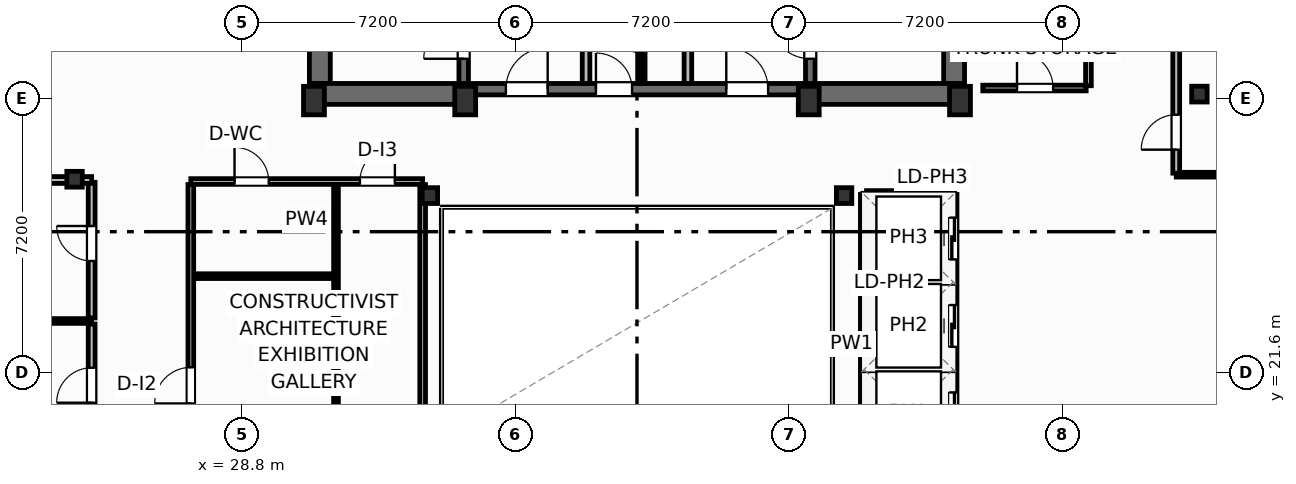
"""IFC4 building model, lengths in metres.
Left out: names, types, materials, properties, quantities, classifications, styles, units other than length and angle.
Written with IfcOpenShell. Run it as: python <this file> out.ifc"""

import sys

from ifc_helpers import new_model, si_unit, direction, frame, frame_2d, origin, origin_2d, place, context, subcontext, project, spatial, rectangle, i_section, extrude, element, fill, save


model = new_model("IFC4")
c1 = context("Model", 3, precision=1e-05, world=origin(), true_north=direction((0.0, 1.0)))
c2 = subcontext(c1, "Body", "Model", "MODEL_VIEW")
j1 = project(units=[si_unit("LENGTHUNIT", "METRE"), si_unit("PLANEANGLEUNIT", "RADIAN")], contexts=[c1])
p1 = place(None, origin())
s1 = spatial("IfcSite", under=j1, at=p1, CompositionType="ELEMENT")
p2 = place(p1, origin())
s2 = spatial("IfcBuilding", under=s1, at=p2, CompositionType="ELEMENT")
p3 = place(p2, frame((0.0, 0.0, 276.7)))
s3 = spatial("IfcBuildingStorey", under=s2, at=p3, CompositionType="ELEMENT", Elevation=276.7)
for number, where, z_axis, x_axis in (
    (1, (30.7, 28.75, 0.0), (0.0, 0.0, 1.0), (1.0, 0.0, 0.0)),
    (2, (34.68, 28.75, 0.0), (0.0, 0.0, 1.0), (1.0, 0.0, 0.0)),
    (3, (43.72, 28.75, 0.0), (0.0, 0.0, 1.0), (1.0, 0.0, 0.0)),
    (4, (47.7, 28.75, 0.0), (0.0, 0.0, 1.0), (1.0, 0.0, 0.0)),
):
    element("IfcColumn", number, at=place(p3, frame(where, z_axis=z_axis, x_axis=x_axis)), inside=s3, PredefinedType="COLUMN", context=c2, shape_type="SweptSolid", body=[
        extrude(rectangle(XDim=0.55, YDim=0.75, at=origin_2d()), origin(), (0.0, 0.0, 1.0), 3.7),
    ])
for number, where, z_axis, x_axis in (
    (5, (33.75, 26.25, 0.0), (0.0, 0.0, 1.0), (1.0, 0.0, 0.0)),
    (6, (44.65, 26.25, 0.0), (0.0, 0.0, 1.0), (1.0, 0.0, 0.0)),
    (7, (24.4, 26.68, 0.0), (0.0, 0.0, 1.0), (1.0, 0.0, 0.0)),
    (8, (54.0, 28.92, 0.0), (0.0, 0.0, 1.0), (1.0, 0.0, 0.0)),
):
    element("IfcColumn", number, at=place(p3, frame(where, z_axis=z_axis, x_axis=x_axis)), inside=s3, PredefinedType="COLUMN", context=c2, shape_type="SweptSolid", body=[
        extrude(i_section(OverallWidth=0.406, OverallDepth=0.416, WebThickness=0.03, FlangeThickness=0.048, FilletRadius=0.025, at=origin_2d()), origin(), (0.0, 0.0, 1.0), 3.7),
    ])
for number, where, z_axis, x_axis in (
    (9, (30.855, 29.2, 0.0), (0.0, 0.0, 1.0), (0.0, 1.0, 0.0)),
    (10, (47.545, 29.2, 0.0), (0.0, 0.0, 1.0), (0.0, 1.0, 0.0)),
):
    element("IfcWall", number, at=place(p3, frame(where, z_axis=z_axis, x_axis=x_axis)), inside=s3, PredefinedType="SHEAR", context=c2, shape_type="SweptSolid", body=[
        extrude(rectangle(XDim=9.22, YDim=0.55, at=frame_2d((4.61, 0.0))), origin(), (0.0, 0.0, 1.0), 3.45),
    ])
for number, where, z_axis, x_axis in (
    (11, (30.58, 28.925, 0.0), (0.0, 0.0, 1.0), (1.0, 0.0, 0.0)),
    (12, (43.6, 28.925, 0.0), (0.0, 0.0, 1.0), (1.0, 0.0, 0.0)),
):
    element("IfcWall", number, at=place(p3, frame(where, z_axis=z_axis, x_axis=x_axis)), inside=s3, PredefinedType="SHEAR", context=c2, shape_type="SweptSolid", body=[
        extrude(rectangle(XDim=4.22, YDim=0.55, at=frame_2d((2.11, 0.0))), origin(), (0.0, 0.0, 1.0), 3.45),
    ])
p4 = place(p3, frame((34.8, 29.05, 0.0), z_axis=(0.0, 0.0, 1.0), x_axis=(1.0, 0.0, 0.0)))
e13 = element("IfcWall", 13, at=p4, inside=s3, PredefinedType="SHEAR", context=c2, shape_type="SweptSolid", body=[
    extrude(rectangle(XDim=8.8, YDim=0.3, at=frame_2d((4.4, 0.0))), origin(), (0.0, 0.0, 1.0), 3.45),
])
p5 = place(p4, frame((0.95, 0.0, 0.0)))
e14 = element("IfcOpeningElement", 14, at=p5, cuts=e13, PredefinedType="OPENING", context=c2, shape_type="SweptSolid", body=[
    extrude(rectangle(XDim=1.1, YDim=2.15, at=frame_2d((0.55, 1.075))), frame((0.0, 0.16, 0.0), z_axis=(0.0, -1.0, 0.0), x_axis=(1.0, 0.0, 0.0)), (0.0, 0.0, 1.0), 0.32),
])
p6 = place(p4, frame((6.75, 0.0, 0.0)))
e15 = element("IfcOpeningElement", 15, at=p6, cuts=e13, PredefinedType="OPENING", context=c2, shape_type="SweptSolid", body=[
    extrude(rectangle(XDim=1.1, YDim=2.15, at=frame_2d((0.55, 1.075))), frame((0.0, 0.16, 0.0), z_axis=(0.0, -1.0, 0.0), x_axis=(1.0, 0.0, 0.0)), (0.0, 0.0, 1.0), 0.32),
])
p7 = place(p4, frame((3.32, 0.0, 0.0)))
e16 = element("IfcOpeningElement", 16, at=p7, cuts=e13, PredefinedType="OPENING", context=c2, shape_type="SweptSolid", body=[
    extrude(rectangle(XDim=0.95, YDim=2.15, at=frame_2d((0.475, 1.075))), frame((0.0, 0.16, 0.0), z_axis=(0.0, -1.0, 0.0), x_axis=(1.0, 0.0, 0.0)), (0.0, 0.0, 1.0), 0.32),
])
p8 = place(p3, frame((34.64, 29.2, 0.0), z_axis=(0.0, 0.0, 1.0), x_axis=(0.0, 1.0, 0.0)))
e17 = element("IfcWall", 17, at=p8, inside=s3, PredefinedType="SHEAR", context=c2, shape_type="SweptSolid", body=[
    extrude(rectangle(XDim=9.22, YDim=0.25, at=frame_2d((4.61, 0.0))), origin(), (0.0, 0.0, 1.0), 3.45),
])
p9 = place(p8, frame((0.65, 0.0, 0.0)))
e18 = element("IfcOpeningElement", 18, at=p9, cuts=e17, PredefinedType="OPENING", context=c2, shape_type="SweptSolid", body=[
    extrude(rectangle(XDim=1.05, YDim=2.15, at=frame_2d((0.525, 1.075))), frame((0.0, 0.135, 0.0), z_axis=(0.0, -1.0, 0.0), x_axis=(1.0, 0.0, 0.0)), (0.0, 0.0, 1.0), 0.27),
])
p10 = place(p3, frame((43.76, 29.2, 0.0), z_axis=(0.0, 0.0, 1.0), x_axis=(0.0, 1.0, 0.0)))
e19 = element("IfcWall", 19, at=p10, inside=s3, PredefinedType="SHEAR", context=c2, shape_type="SweptSolid", body=[
    extrude(rectangle(XDim=9.22, YDim=0.25, at=frame_2d((4.61, 0.0))), origin(), (0.0, 0.0, 1.0), 3.45),
])
p11 = place(p10, frame((0.65, 0.0, 0.0)))
e20 = element("IfcOpeningElement", 20, at=p11, cuts=e19, PredefinedType="OPENING", context=c2, shape_type="SweptSolid", body=[
    extrude(rectangle(XDim=1.05, YDim=2.15, at=frame_2d((0.525, 1.075))), frame((0.0, 0.135, 0.0), z_axis=(0.0, -1.0, 0.0), x_axis=(1.0, 0.0, 0.0)), (0.0, 0.0, 1.0), 0.27),
])
p12 = place(p3, frame((24.85, 19.3, 0.0), z_axis=(0.0, 0.0, 1.0), x_axis=(0.0, 1.0, 0.0)))
e21 = element("IfcWall", 21, at=p12, inside=s3, PredefinedType="PARTITIONING", context=c2, shape_type="SweptSolid", body=[
    extrude(rectangle(XDim=3.57, YDim=0.18, at=frame_2d((1.785, 0.0))), origin(), (0.0, 0.0, 1.0), 3.45),
])
p13 = place(p12, frame((1.5, 0.0, 0.0)))
e22 = element("IfcOpeningElement", 22, at=p13, cuts=e21, PredefinedType="OPENING", context=c2, shape_type="SweptSolid", body=[
    extrude(rectangle(XDim=0.92, YDim=2.05, at=frame_2d((0.46, 1.025))), frame((0.0, 0.1, 0.0), z_axis=(0.0, -1.0, 0.0), x_axis=(1.0, 0.0, 0.0)), (0.0, 0.0, 1.0), 0.2),
])
p14 = place(p3, frame((24.85, 23.03, 0.0), z_axis=(0.0, 0.0, 1.0), x_axis=(0.0, 1.0, 0.0)))
e23 = element("IfcWall", 23, at=p14, inside=s3, PredefinedType="PARTITIONING", context=c2, shape_type="SweptSolid", body=[
    extrude(rectangle(XDim=3.57, YDim=0.18, at=frame_2d((1.785, 0.0))), origin(), (0.0, 0.0, 1.0), 3.45),
])
p15 = place(p14, frame((1.5, 0.0, 0.0)))
e24 = element("IfcOpeningElement", 24, at=p15, cuts=e23, PredefinedType="OPENING", context=c2, shape_type="SweptSolid", body=[
    extrude(rectangle(XDim=0.92, YDim=2.05, at=frame_2d((0.46, 1.025))), frame((0.0, 0.1, 0.0), z_axis=(0.0, -1.0, 0.0), x_axis=(1.0, 0.0, 0.0)), (0.0, 0.0, 1.0), 0.2),
])
p16 = place(p3, frame((2.424, 22.95, 0.0), z_axis=(0.0, 0.0, 1.0), x_axis=(1.0, 0.0, 0.0)))
e25 = element("IfcWall", 25, at=p16, inside=s3, PredefinedType="PARTITIONING", context=c2, shape_type="SweptSolid", body=[
    extrude(rectangle(XDim=22.426, YDim=0.125, at=frame_2d((11.213, 0.0))), origin(), (0.0, 0.0, 1.0), 3.45),
])
p17 = place(p3, frame((5.107, 26.66, 0.0), z_axis=(0.0, 0.0, 1.0), x_axis=(1.0, 0.0, 0.0)))
e26 = element("IfcWall", 26, at=p17, inside=s3, PredefinedType="PARTITIONING", context=c2, shape_type="SweptSolid", body=[
    extrude(rectangle(XDim=19.743, YDim=0.18, at=frame_2d((9.872, 0.0))), origin(), (0.0, 0.0, 1.0), 2.662),
])
p18 = place(p3, frame((53.39, 26.8, 0.0), z_axis=(0.0, 0.0, 1.0), x_axis=(1.0, 0.0, 0.0)))
e27 = element("IfcWall", 27, at=p18, inside=s3, PredefinedType="PARTITIONING", context=c2, shape_type="SweptSolid", body=[
    extrude(rectangle(XDim=22.348, YDim=0.125, at=frame_2d((11.174, 0.0))), origin(), (0.0, 0.0, 1.0), 3.45),
])
p19 = place(p3, frame((53.39, 26.84, 0.0), z_axis=(0.0, 0.0, 1.0), x_axis=(0.0, 1.0, 0.0)))
e28 = element("IfcWall", 28, at=p19, inside=s3, PredefinedType="PARTITIONING", context=c2, shape_type="SweptSolid", body=[
    extrude(rectangle(XDim=12.46, YDim=0.18, at=frame_2d((6.23, 0.0))), origin(), (0.0, 0.0, 1.0), 3.45),
])
p20 = place(p19, frame((0.618, 0.0, 0.0)))
e29 = element("IfcOpeningElement", 29, at=p20, cuts=e28, PredefinedType="OPENING", context=c2, shape_type="SweptSolid", body=[
    extrude(rectangle(XDim=0.92, YDim=2.05, at=frame_2d((0.46, 1.025))), frame((0.0, 0.1, 0.0), z_axis=(0.0, -1.0, 0.0), x_axis=(1.0, 0.0, 0.0)), (0.0, 0.0, 1.0), 0.2),
])
for number, where, z_axis, x_axis in (
    (30, (37.86, 29.2, 0.0), (0.0, 0.0, 1.0), (0.0, 1.0, 0.0)),
    (31, (40.54, 29.2, 0.0), (0.0, 0.0, 1.0), (0.0, 1.0, 0.0)),
):
    element("IfcWall", number, at=place(p3, frame(where, z_axis=z_axis, x_axis=x_axis)), inside=s3, PredefinedType="PARTITIONING", context=c2, shape_type="SweptSolid", body=[
        extrude(rectangle(XDim=5.18, YDim=0.2, at=frame_2d((2.59, 0.0))), origin(), (0.0, 0.0, 1.0), 3.45),
    ])
p21 = place(p3, frame((39.35, 29.2, 0.0), z_axis=(0.0, 0.0, 1.0), x_axis=(0.0, 1.0, 0.0)))
e32 = element("IfcWall", 32, at=p21, inside=s3, PredefinedType="PARTITIONING", context=c2, shape_type="SweptSolid", body=[
    extrude(rectangle(XDim=5.22, YDim=0.125, at=frame_2d((2.61, 0.0))), origin(), (0.0, 0.0, 1.0), 3.45),
])
p22 = place(p21, frame((0.8, 0.0, 0.0)))
e33 = element("IfcOpeningElement", 33, at=p22, cuts=e32, PredefinedType="OPENING", context=c2, shape_type="SweptSolid", body=[
    extrude(rectangle(XDim=0.85, YDim=2.05, at=frame_2d((0.425, 1.025))), frame((0.0, 0.073, 0.0), z_axis=(0.0, -1.0, 0.0), x_axis=(1.0, 0.0, 0.0)), (0.0, 0.0, 1.0), 0.145),
])
p23 = place(p21, frame((3.4, 0.0, 0.0)))
e34 = element("IfcOpeningElement", 34, at=p23, cuts=e32, PredefinedType="OPENING", context=c2, shape_type="SweptSolid", body=[
    extrude(rectangle(XDim=0.85, YDim=2.05, at=frame_2d((0.425, 1.025))), frame((0.0, 0.073, 0.0), z_axis=(0.0, -1.0, 0.0), x_axis=(1.0, 0.0, 0.0)), (0.0, 0.0, 1.0), 0.145),
])
p24 = place(p3, frame((27.46, 26.62, 0.0), z_axis=(0.0, 0.0, 1.0), x_axis=(1.0, 0.0, 0.0)))
e35 = element("IfcWall", 35, at=p24, inside=s3, PredefinedType="PARTITIONING", context=c2, shape_type="SweptSolid", body=[
    extrude(rectangle(XDim=6.1, YDim=0.15, at=frame_2d((3.05, 0.0))), origin(), (0.0, 0.0, 1.0), 2.662),
])
p25 = place(p24, frame((1.15, 0.0, 0.0)))
e36 = element("IfcOpeningElement", 36, at=p25, cuts=e35, PredefinedType="OPENING", context=c2, shape_type="SweptSolid", body=[
    extrude(rectangle(XDim=0.9, YDim=2.05, at=frame_2d((0.45, 1.025))), frame((0.0, 0.085, 0.0), z_axis=(0.0, -1.0, 0.0), x_axis=(1.0, 0.0, 0.0)), (0.0, 0.0, 1.0), 0.17),
])
p26 = place(p24, frame((4.45, 0.0, 0.0)))
e37 = element("IfcOpeningElement", 37, at=p26, cuts=e35, PredefinedType="OPENING", context=c2, shape_type="SweptSolid", body=[
    extrude(rectangle(XDim=0.92, YDim=2.05, at=frame_2d((0.46, 1.025))), frame((0.0, 0.085, 0.0), z_axis=(0.0, -1.0, 0.0), x_axis=(1.0, 0.0, 0.0)), (0.0, 0.0, 1.0), 0.17),
])
p27 = place(p3, frame((31.28, 19.38, 0.0), z_axis=(0.0, 0.0, 1.0), x_axis=(0.0, 1.0, 0.0)))
e38 = element("IfcWall", 38, at=p27, inside=s3, PredefinedType="PARTITIONING", context=c2, shape_type="SweptSolid", body=[
    extrude(rectangle(XDim=7.16, YDim=0.125, at=frame_2d((3.58, 0.0))), origin(), (0.0, 0.0, 1.0), 3.45),
])
p28 = place(p3, frame((27.52, 24.13, 0.0), z_axis=(0.0, 0.0, 1.0), x_axis=(1.0, 0.0, 0.0)))
e39 = element("IfcWall", 39, at=p28, inside=s3, PredefinedType="PARTITIONING", context=c2, shape_type="SweptSolid", body=[
    extrude(rectangle(XDim=3.7, YDim=0.125, at=frame_2d((1.85, 0.0))), origin(), (0.0, 0.0, 1.0), 3.45),
])
p29 = place(p3, frame((27.46, 19.38, 0.0), z_axis=(0.0, 0.0, 1.0), x_axis=(0.0, 1.0, 0.0)))
e40 = element("IfcWall", 40, at=p29, inside=s3, PredefinedType="PARTITIONING", context=c2, shape_type="SweptSolid", body=[
    extrude(rectangle(XDim=7.16, YDim=0.15, at=frame_2d((3.58, 0.0))), origin(), (0.0, 0.0, 1.0), 3.45),
])
p30 = place(p29, frame((1.4, 0.0, 0.0)))
e41 = element("IfcOpeningElement", 41, at=p30, cuts=e40, PredefinedType="OPENING", context=c2, shape_type="SweptSolid", body=[
    extrude(rectangle(XDim=0.95, YDim=2.05, at=frame_2d((0.475, 1.025))), frame((0.0, 0.085, 0.0), z_axis=(0.0, -1.0, 0.0), x_axis=(1.0, 0.0, 0.0)), (0.0, 0.0, 1.0), 0.17),
])
p31 = place(p3, frame((33.56, 19.38, 0.0), z_axis=(0.0, 0.0, 1.0), x_axis=(0.0, 1.0, 0.0)))
e42 = element("IfcWall", 42, at=p31, inside=s3, PredefinedType="PARTITIONING", context=c2, shape_type="SweptSolid", body=[
    extrude(rectangle(XDim=7.16, YDim=0.15, at=frame_2d((3.58, 0.0))), origin(), (0.0, 0.0, 1.0), 2.824),
])
p32 = place(p3, frame((48.3, 29.08, 0.0), z_axis=(0.0, 0.0, 1.0), x_axis=(1.0, 0.0, 0.0)))
e43 = element("IfcWall", 43, at=p32, inside=s3, PredefinedType="PARTITIONING", context=c2, shape_type="SweptSolid", body=[
    extrude(rectangle(XDim=2.72, YDim=0.15, at=frame_2d((1.36, 0.0))), origin(), (0.0, 0.0, 1.0), 2.662),
])
p33 = place(p32, frame((0.9, 0.0, 0.0)))
e44 = element("IfcOpeningElement", 44, at=p33, cuts=e43, PredefinedType="OPENING", context=c2, shape_type="SweptSolid", body=[
    extrude(rectangle(XDim=0.95, YDim=2.05, at=frame_2d((0.475, 1.025))), frame((0.0, 0.085, 0.0), z_axis=(0.0, -1.0, 0.0), x_axis=(1.0, 0.0, 0.0)), (0.0, 0.0, 1.0), 0.17),
])
p34 = place(p3, frame((51.08, 29.14, 0.0), z_axis=(0.0, 0.0, 1.0), x_axis=(0.0, 1.0, 0.0)))
e45 = element("IfcWall", 45, at=p34, inside=s3, PredefinedType="PARTITIONING", context=c2, shape_type="SweptSolid", body=[
    extrude(rectangle(XDim=4.69, YDim=0.15, at=frame_2d((2.345, 0.0))), origin(), (0.0, 0.0, 1.0), 3.45),
])
for number, where, z_axis, x_axis in (
    (46, (45.24, 21.675, 0.0), (0.0, 0.0, 1.0), (1.0, 0.0, 0.0)),
    (47, (45.24, 23.975, 0.0), (0.0, 0.0, 1.0), (1.0, 0.0, 0.0)),
    (48, (45.24, 26.28, 0.0), (0.0, 0.0, 1.0), (1.0, 0.0, 0.0)),
):
    element("IfcWall", number, at=place(p3, frame(where, z_axis=z_axis, x_axis=x_axis)), inside=s3, PredefinedType="PARTITIONING", context=c2, shape_type="SweptSolid", body=[
        extrude(rectangle(XDim=2.22, YDim=0.2, at=frame_2d((1.11, 0.0))), origin(), (0.0, 0.0, 1.0), 3.45),
    ])
p35 = place(p3, frame((45.18, 19.38, 0.0), z_axis=(0.0, 0.0, 1.0), x_axis=(0.0, 1.0, 0.0)))
e49 = element("IfcWall", 49, at=p35, inside=s3, PredefinedType="PARTITIONING", context=c2, shape_type="SweptSolid", body=[
    extrude(rectangle(XDim=6.9, YDim=0.2, at=frame_2d((3.45, 0.0))), origin(), (0.0, 0.0, 1.0), 3.45),
])
p36 = place(p3, frame((47.52, 19.38, 0.0), z_axis=(0.0, 0.0, 1.0), x_axis=(0.0, 1.0, 0.0)))
e50 = element("IfcWall", 50, at=p36, inside=s3, PredefinedType="PARTITIONING", context=c2, shape_type="SweptSolid", body=[
    extrude(rectangle(XDim=6.9, YDim=0.2, at=frame_2d((3.45, 0.0))), origin(), (0.0, 0.0, 1.0), 3.45),
])
p37 = place(p36, frame((0.59, 0.0, 0.0)))
e51 = element("IfcOpeningElement", 51, at=p37, cuts=e50, PredefinedType="OPENING", context=c2, shape_type="SweptSolid", body=[
    extrude(rectangle(XDim=1.1, YDim=2.15, at=frame_2d((0.55, 1.075))), frame((0.0, 0.11, 0.0), z_axis=(0.0, -1.0, 0.0), x_axis=(1.0, 0.0, 0.0)), (0.0, 0.0, 1.0), 0.22),
])
p38 = place(p36, frame((2.89, 0.0, 0.0)))
e52 = element("IfcOpeningElement", 52, at=p38, cuts=e50, PredefinedType="OPENING", context=c2, shape_type="SweptSolid", body=[
    extrude(rectangle(XDim=1.1, YDim=2.15, at=frame_2d((0.55, 1.075))), frame((0.0, 0.11, 0.0), z_axis=(0.0, -1.0, 0.0), x_axis=(1.0, 0.0, 0.0)), (0.0, 0.0, 1.0), 0.22),
])
p39 = place(p36, frame((5.19, 0.0, 0.0)))
e53 = element("IfcOpeningElement", 53, at=p39, cuts=e50, PredefinedType="OPENING", context=c2, shape_type="SweptSolid", body=[
    extrude(rectangle(XDim=1.1, YDim=2.15, at=frame_2d((0.55, 1.075))), frame((0.0, 0.11, 0.0), z_axis=(0.0, -1.0, 0.0), x_axis=(1.0, 0.0, 0.0)), (0.0, 0.0, 1.0), 0.22),
])
p40 = place(p13, origin())
e54 = element("IfcDoor", 54, at=p40, inside=s3, OperationType="SINGLE_SWING_LEFT", PredefinedType="DOOR", context=c2, shape_type="SweptSolid", body=[
    extrude(rectangle(XDim=0.92, YDim=2.05, at=frame_2d((0.46, 1.025))), frame((0.0, 0.025, 0.0), z_axis=(0.0, -1.0, 0.0), x_axis=(1.0, 0.0, 0.0)), (0.0, 0.0, 1.0), 0.05),
])
fill(e22, e54)
p41 = place(p15, origin())
e55 = element("IfcDoor", 55, at=p41, inside=s3, OperationType="SINGLE_SWING_RIGHT", PredefinedType="DOOR", context=c2, shape_type="SweptSolid", body=[
    extrude(rectangle(XDim=0.92, YDim=2.05, at=frame_2d((0.46, 1.025))), frame((0.0, 0.025, 0.0), z_axis=(0.0, -1.0, 0.0), x_axis=(1.0, 0.0, 0.0)), (0.0, 0.0, 1.0), 0.05),
])
fill(e24, e55)
p42 = place(p20, origin())
e56 = element("IfcDoor", 56, at=p42, inside=s3, OperationType="SINGLE_SWING_LEFT", PredefinedType="DOOR", context=c2, shape_type="SweptSolid", body=[
    extrude(rectangle(XDim=0.92, YDim=2.05, at=frame_2d((0.46, 1.025))), frame((0.0, 0.025, 0.0), z_axis=(0.0, -1.0, 0.0), x_axis=(1.0, 0.0, 0.0)), (0.0, 0.0, 1.0), 0.05),
])
fill(e29, e56)
p43 = place(p9, origin())
e57 = element("IfcDoor", 57, at=p43, inside=s3, OperationType="SINGLE_SWING_LEFT", PredefinedType="DOOR", context=c2, shape_type="SweptSolid", body=[
    extrude(rectangle(XDim=1.05, YDim=2.15, at=frame_2d((0.525, 1.075))), frame((0.0, 0.025, 0.0), z_axis=(0.0, -1.0, 0.0), x_axis=(1.0, 0.0, 0.0)), (0.0, 0.0, 1.0), 0.05),
])
fill(e18, e57)
p44 = place(p11, origin())
e58 = element("IfcDoor", 58, at=p44, inside=s3, OperationType="SINGLE_SWING_RIGHT", PredefinedType="DOOR", context=c2, shape_type="SweptSolid", body=[
    extrude(rectangle(XDim=1.05, YDim=2.15, at=frame_2d((0.525, 1.075))), frame((0.0, 0.025, 0.0), z_axis=(0.0, -1.0, 0.0), x_axis=(1.0, 0.0, 0.0)), (0.0, 0.0, 1.0), 0.05),
])
fill(e20, e58)
p45 = place(p5, origin())
e59 = element("IfcDoor", 59, at=p45, inside=s3, OperationType="SINGLE_SWING_RIGHT", PredefinedType="DOOR", context=c2, shape_type="SweptSolid", body=[
    extrude(rectangle(XDim=1.1, YDim=2.15, at=frame_2d((0.55, 1.075))), frame((0.0, 0.025, 0.0), z_axis=(0.0, -1.0, 0.0), x_axis=(1.0, 0.0, 0.0)), (0.0, 0.0, 1.0), 0.05),
])
fill(e14, e59)
p46 = place(p6, origin())
e60 = element("IfcDoor", 60, at=p46, inside=s3, OperationType="SINGLE_SWING_LEFT", PredefinedType="DOOR", context=c2, shape_type="SweptSolid", body=[
    extrude(rectangle(XDim=1.1, YDim=2.15, at=frame_2d((0.55, 1.075))), frame((0.0, 0.025, 0.0), z_axis=(0.0, -1.0, 0.0), x_axis=(1.0, 0.0, 0.0)), (0.0, 0.0, 1.0), 0.05),
])
fill(e15, e60)
p47 = place(p22, origin())
e61 = element("IfcDoor", 61, at=p47, inside=s3, OperationType="SINGLE_SWING_RIGHT", PredefinedType="DOOR", context=c2, shape_type="SweptSolid", body=[
    extrude(rectangle(XDim=0.85, YDim=2.05, at=frame_2d((0.425, 1.025))), frame((0.0, 0.025, 0.0), z_axis=(0.0, -1.0, 0.0), x_axis=(1.0, 0.0, 0.0)), (0.0, 0.0, 1.0), 0.05),
])
fill(e33, e61)
p48 = place(p7, origin())
e62 = element("IfcDoor", 62, at=p48, inside=s3, OperationType="SINGLE_SWING_LEFT", PredefinedType="DOOR", context=c2, shape_type="SweptSolid", body=[
    extrude(rectangle(XDim=0.95, YDim=2.15, at=frame_2d((0.475, 1.075))), frame((0.0, 0.025, 0.0), z_axis=(0.0, -1.0, 0.0), x_axis=(1.0, 0.0, 0.0)), (0.0, 0.0, 1.0), 0.05),
])
fill(e16, e62)
p49 = place(p25, origin())
e63 = element("IfcDoor", 63, at=p49, inside=s3, OperationType="SINGLE_SWING_LEFT", PredefinedType="DOOR", context=c2, shape_type="SweptSolid", body=[
    extrude(rectangle(XDim=0.9, YDim=2.05, at=frame_2d((0.45, 1.025))), frame((0.0, 0.025, 0.0), z_axis=(0.0, -1.0, 0.0), x_axis=(1.0, 0.0, 0.0)), (0.0, 0.0, 1.0), 0.05),
])
fill(e36, e63)
p50 = place(p26, origin())
e64 = element("IfcDoor", 64, at=p50, inside=s3, OperationType="SINGLE_SWING_RIGHT", PredefinedType="DOOR", context=c2, shape_type="SweptSolid", body=[
    extrude(rectangle(XDim=0.92, YDim=2.05, at=frame_2d((0.46, 1.025))), frame((0.0, 0.025, 0.0), z_axis=(0.0, -1.0, 0.0), x_axis=(1.0, 0.0, 0.0)), (0.0, 0.0, 1.0), 0.05),
])
fill(e37, e64)
p51 = place(p30, origin())
e65 = element("IfcDoor", 65, at=p51, inside=s3, OperationType="SINGLE_SWING_LEFT", PredefinedType="DOOR", context=c2, shape_type="SweptSolid", body=[
    extrude(rectangle(XDim=0.95, YDim=2.05, at=frame_2d((0.475, 1.025))), frame((0.0, 0.025, 0.0), z_axis=(0.0, -1.0, 0.0), x_axis=(1.0, 0.0, 0.0)), (0.0, 0.0, 1.0), 0.05),
])
fill(e41, e65)
p52 = place(p33, origin())
e66 = element("IfcDoor", 66, at=p52, inside=s3, OperationType="SINGLE_SWING_LEFT", PredefinedType="DOOR", context=c2, shape_type="SweptSolid", body=[
    extrude(rectangle(XDim=0.95, YDim=2.05, at=frame_2d((0.475, 1.025))), frame((0.0, 0.025, 0.0), z_axis=(0.0, -1.0, 0.0), x_axis=(1.0, 0.0, 0.0)), (0.0, 0.0, 1.0), 0.05),
])
fill(e44, e66)
p53 = place(p37, origin())
e67 = element("IfcDoor", 67, at=p53, inside=s3, OperationType="SLIDING_TO_LEFT", PredefinedType="DOOR", context=c2, shape_type="SweptSolid", body=[
    extrude(rectangle(XDim=1.1, YDim=2.15, at=frame_2d((0.55, 1.075))), frame((0.0, 0.025, 0.0), z_axis=(0.0, -1.0, 0.0), x_axis=(1.0, 0.0, 0.0)), (0.0, 0.0, 1.0), 0.05),
])
fill(e51, e67)
p54 = place(p38, origin())
e68 = element("IfcDoor", 68, at=p54, inside=s3, OperationType="SLIDING_TO_LEFT", PredefinedType="DOOR", context=c2, shape_type="SweptSolid", body=[
    extrude(rectangle(XDim=1.1, YDim=2.15, at=frame_2d((0.55, 1.075))), frame((0.0, 0.025, 0.0), z_axis=(0.0, -1.0, 0.0), x_axis=(1.0, 0.0, 0.0)), (0.0, 0.0, 1.0), 0.05),
])
fill(e52, e68)
p55 = place(p39, origin())
e69 = element("IfcDoor", 69, at=p55, inside=s3, OperationType="SLIDING_TO_LEFT", PredefinedType="DOOR", context=c2, shape_type="SweptSolid", body=[
    extrude(rectangle(XDim=1.1, YDim=2.15, at=frame_2d((0.55, 1.075))), frame((0.0, 0.025, 0.0), z_axis=(0.0, -1.0, 0.0), x_axis=(1.0, 0.0, 0.0)), (0.0, 0.0, 1.0), 0.05),
])
fill(e53, e69)
save(model, sys.argv[1])
